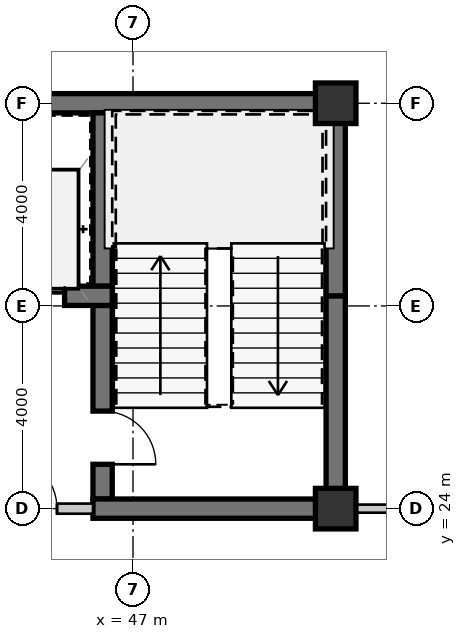
"""IFC4 building model, lengths in metres.
Left out: names, types, materials, properties, quantities, classifications, styles, units other than length and angle.
Written with IfcOpenShell. Run it as: python <this file> out.ifc"""

import sys

from ifc_helpers import new_model, si_unit, direction, frame, frame_2d, origin, origin_2d, place, context, subcontext, project, spatial, rectangle, extrude, source, transform, mapped, element, fill, save


model = new_model("IFC4")
c1 = context("Model", 3, precision=1e-05, world=origin(), true_north=direction((0.0, 1.0)))
c2 = subcontext(c1, "Body", "Model", "MODEL_VIEW")
j1 = project(units=[si_unit("LENGTHUNIT", "METRE"), si_unit("PLANEANGLEUNIT", "RADIAN")], contexts=[c1])
p1 = place(None, origin())
s1 = spatial("IfcSite", under=j1, at=p1, CompositionType="ELEMENT")
p2 = place(p1, origin())
s2 = spatial("IfcBuilding", under=s1, at=p2, CompositionType="ELEMENT")
p3 = place(p2, frame((0.0, 0.0, 51.45)))
s3 = spatial("IfcBuildingStorey", under=s2, at=p3, CompositionType="ELEMENT", Elevation=51.45)
m1 = source(origin(), c2, "Body", "SweptSolid", [
    extrude(rectangle(XDim=0.8, YDim=0.8, at=origin_2d()), origin(), (0.0, 0.0, 1.0), 3.15),
])
for number, where, z_axis, x_axis in (
    (1, (51.0, 24.0, 0.0), (0.0, 0.0, 1.0), (1.0, 0.0, 0.0)),
    (2, (51.0, 32.0, 0.0), (0.0, 0.0, 1.0), (1.0, 0.0, 0.0)),
):
    element("IfcColumn", number, at=place(p3, frame(where, z_axis=z_axis, x_axis=x_axis)), inside=s3, PredefinedType="COLUMN", context=c2, shape_type="MappedRepresentation", body=[
        mapped(m1, transform((0.0, 0.0, 0.0), scale=1.0)),
    ])
m2 = source(origin(), c2, "Body", "SweptSolid", [
    extrude(rectangle(XDim=11.99, YDim=0.38, at=frame_2d((5.995, 0.0))), origin(), (0.0, 0.0, 1.0), 2.93),
])
p4 = place(p3, frame((39.2, 32.0, 0.0), z_axis=(0.0, 0.0, 1.0), x_axis=(1.0, 0.0, 0.0)))
e3 = element("IfcWall", 3, at=p4, inside=s3, PredefinedType="SHEAR", context=c2, shape_type="MappedRepresentation", body=[
    mapped(m2, transform((0.0, 0.0, 0.0), scale=1.0)),
])
m3 = source(origin(), c2, "Body", "SweptSolid", [
    extrude(rectangle(XDim=4.01, YDim=0.38, at=frame_2d((2.005, 0.0))), origin(), (0.0, 0.0, 1.0), 2.93),
])
p5 = place(p3, frame((51.0, 24.19, 0.0), z_axis=(0.0, 0.0, 1.0), x_axis=(0.0, 1.0, 0.0)))
e4 = element("IfcWall", 4, at=p5, inside=s3, PredefinedType="SHEAR", context=c2, shape_type="MappedRepresentation", body=[
    mapped(m3, transform((0.0, 0.0, 0.0), scale=1.0)),
])
m4 = source(origin(), c2, "Body", "SweptSolid", [
    extrude(rectangle(XDim=3.61, YDim=0.38, at=frame_2d((1.805, 0.0))), origin(), (0.0, 0.0, 1.0), 2.93),
])
p6 = place(p3, frame((51.0, 28.2, 0.0), z_axis=(0.0, 0.0, 1.0), x_axis=(0.0, 1.0, 0.0)))
e5 = element("IfcWall", 5, at=p6, inside=s3, PredefinedType="SHEAR", context=c2, shape_type="MappedRepresentation", body=[
    mapped(m4, transform((0.0, 0.0, 0.0), scale=1.0)),
])
m5 = source(origin(), c2, "Body", "SweptSolid", [
    extrude(rectangle(XDim=3.42, YDim=0.38, at=frame_2d((1.71, 0.0))), origin(), (0.0, 0.0, 1.0), 2.93),
])
p7 = place(p3, frame((46.4, 31.81, 0.0), z_axis=(0.0, 0.0, 1.0), x_axis=(0.0, -1.0, 0.0)))
e6 = element("IfcWall", 6, at=p7, inside=s3, PredefinedType="SHEAR", context=c2, shape_type="MappedRepresentation", body=[
    mapped(m5, transform((0.0, 0.0, 0.0), scale=1.0)),
])
m6 = source(origin(), c2, "Body", "SweptSolid", [
    extrude(rectangle(XDim=3.82, YDim=0.38, at=frame_2d((1.91, 0.0))), origin(), (0.0, 0.0, 1.0), 2.93),
])
p8 = place(p3, frame((46.4, 28.01, 0.0), z_axis=(0.0, 0.0, 1.0), x_axis=(0.0, -1.0, 0.0)))
e7 = element("IfcWall", 7, at=p8, inside=s3, PredefinedType="SHEAR", context=c2, shape_type="MappedRepresentation", body=[
    mapped(m6, transform((0.0, 0.0, 0.0), scale=1.0)),
])
m7 = source(origin(), c2, "Body", "SweptSolid", [
    extrude(rectangle(XDim=1.05, YDim=2.1, at=frame_2d((0.525, 1.05))), frame((0.0, 0.2, 0.0), z_axis=(0.0, -1.0, 0.0), x_axis=(1.0, 0.0, 0.0)), (0.0, 0.0, 1.0), 0.4),
])
p9 = place(p8, frame((2.085, 0.0, 0.0)))
e8 = element("IfcOpeningElement", 8, at=p9, cuts=e7, PredefinedType="OPENING", context=c2, shape_type="MappedRepresentation", body=[
    mapped(m7, transform((0.0, 0.0, 0.0), scale=1.0)),
])
m8 = source(origin(), c2, "Body", "SweptSolid", [
    extrude(rectangle(XDim=4.98, YDim=0.38, at=frame_2d((2.49, 0.0))), origin(), (0.0, 0.0, 1.0), 2.93),
])
p10 = place(p3, frame((46.21, 24.0, 0.0), z_axis=(0.0, 0.0, 1.0), x_axis=(1.0, 0.0, 0.0)))
e9 = element("IfcWall", 9, at=p10, inside=s3, PredefinedType="SHEAR", context=c2, shape_type="MappedRepresentation", body=[
    mapped(m8, transform((0.0, 0.0, 0.0), scale=1.0)),
])
m9 = source(origin(), c2, "Body", "SweptSolid", [
    extrude(rectangle(XDim=2.98, YDim=0.38, at=frame_2d((1.49, 0.0))), origin(), (0.0, 0.0, 1.0), 2.93),
])
p11 = place(p3, frame((43.61, 28.2, 0.0), z_axis=(0.0, 0.0, 1.0), x_axis=(1.0, 0.0, 0.0)))
e10 = element("IfcWall", 10, at=p11, inside=s3, PredefinedType="SHEAR", context=c2, shape_type="MappedRepresentation", body=[
    mapped(m9, transform((0.0, 0.0, 0.0), scale=1.0)),
])
m10 = source(origin(), c2, "Body", "SweptSolid", [
    extrude(rectangle(XDim=1.1, YDim=2.15, at=frame_2d((0.55, 1.075))), frame((0.0, 0.2, 0.0), z_axis=(0.0, -1.0, 0.0), x_axis=(1.0, 0.0, 0.0)), (0.0, 0.0, 1.0), 0.4),
])
p12 = place(p11, frame((0.94, 0.0, 0.0)))
e11 = element("IfcOpeningElement", 11, at=p12, cuts=e10, PredefinedType="OPENING", context=c2, shape_type="MappedRepresentation", body=[
    mapped(m10, transform((0.0, 0.0, 0.0), scale=1.0)),
])
m11 = source(origin(), c2, "Body", "SweptSolid", [
    extrude(rectangle(XDim=2.66, YDim=0.2, at=frame_2d((1.33, 0.0))), origin(), (0.0, 0.0, 1.0), 2.397),
])
p13 = place(p3, frame((43.55, 24.0, 0.0), z_axis=(0.0, 0.0, 1.0), x_axis=(1.0, 0.0, 0.0)))
e12 = element("IfcWall", 12, at=p13, inside=s3, PredefinedType="SOLIDWALL", context=c2, shape_type="MappedRepresentation", body=[
    mapped(m11, transform((0.0, 0.0, 0.0), scale=1.0)),
])
m12 = source(origin(), c2, "Body", "SweptSolid", [
    extrude(rectangle(XDim=1.05, YDim=2.1, at=frame_2d((0.525, 1.05))), frame((0.0, 0.11, 0.0), z_axis=(0.0, -1.0, 0.0), x_axis=(1.0, 0.0, 0.0)), (0.0, 0.0, 1.0), 0.22),
])
p14 = place(p13, frame((0.9, 0.0, 0.0)))
e13 = element("IfcOpeningElement", 13, at=p14, cuts=e12, PredefinedType="OPENING", context=c2, shape_type="MappedRepresentation", body=[
    mapped(m12, transform((0.0, 0.0, 0.0), scale=1.0)),
])
m13 = source(origin(), c2, "Body", "SweptSolid", [
    extrude(rectangle(XDim=4.13, YDim=0.16, at=frame_2d((2.065, 0.0))), origin(), (0.0, 0.0, 1.0), 2.93),
])
p15 = place(p3, frame((51.19, 24.0, 0.0), z_axis=(0.0, 0.0, 1.0), x_axis=(1.0, 0.0, 0.0)))
e14 = element("IfcWall", 14, at=p15, inside=s3, PredefinedType="PARTITIONING", context=c2, shape_type="MappedRepresentation", body=[
    mapped(m13, transform((0.0, 0.0, 0.0), scale=1.0)),
])
m14 = source(origin(), c2, "Body", "SweptSolid", [
    extrude(rectangle(XDim=1.05, YDim=2.1, at=frame_2d((0.525, 1.05))), frame((0.0, 0.025, 0.0), z_axis=(0.0, -1.0, 0.0), x_axis=(1.0, 0.0, 0.0)), (0.0, 0.0, 1.0), 0.05),
])
p16 = place(p9, origin())
e15 = element("IfcDoor", 15, at=p16, inside=s3, OperationType="SINGLE_SWING_RIGHT", PredefinedType="DOOR", context=c2, shape_type="MappedRepresentation", body=[
    mapped(m14, transform((0.0, 0.0, 0.0), scale=1.0)),
])
fill(e8, e15)
m15 = source(origin(), c2, "Body", "SweptSolid", [
    extrude(rectangle(XDim=1.1, YDim=2.15, at=frame_2d((0.55, 1.075))), frame((0.0, 0.025, 0.0), z_axis=(0.0, -1.0, 0.0), x_axis=(1.0, 0.0, 0.0)), (0.0, 0.0, 1.0), 0.05),
])
p17 = place(p12, origin())
e16 = element("IfcDoor", 16, at=p17, inside=s3, OperationType="SLIDING_TO_LEFT", PredefinedType="DOOR", context=c2, shape_type="MappedRepresentation", body=[
    mapped(m15, transform((0.0, 0.0, 0.0), scale=1.0)),
])
fill(e11, e16)
p18 = place(p14, origin())
e17 = element("IfcDoor", 17, at=p18, inside=s3, OperationType="SINGLE_SWING_LEFT", PredefinedType="DOOR", context=c2, shape_type="MappedRepresentation", body=[
    mapped(m14, transform((0.0, 0.0, 0.0), scale=1.0)),
])
fill(e13, e17)
save(model, sys.argv[1])
